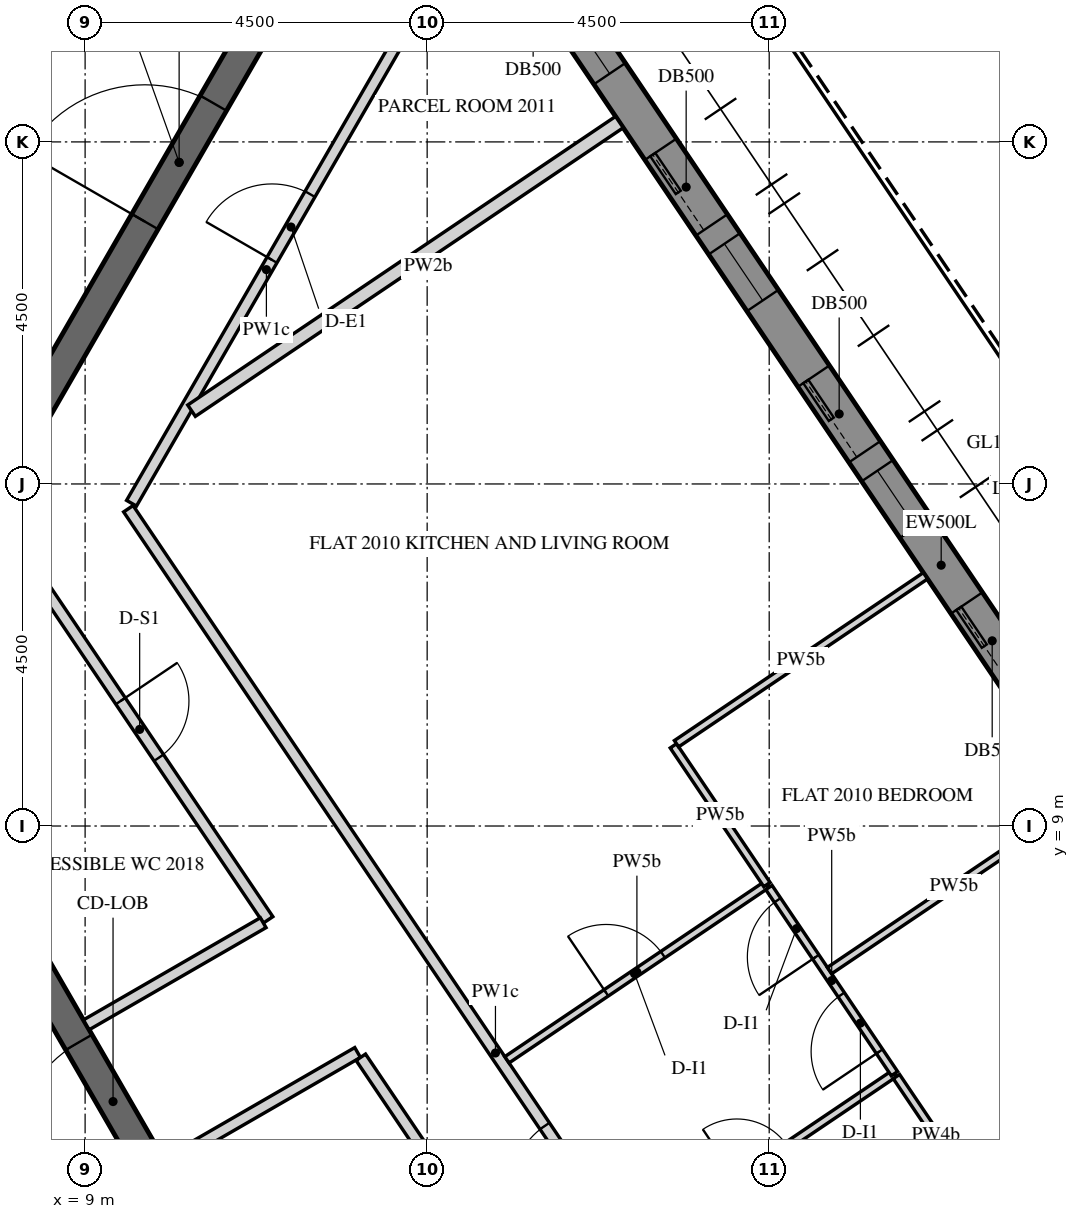
"""IFC4 building model, lengths in metres.
Left out: names, types, materials, properties, quantities, classifications, styles, units other than length and angle.
Written with IfcOpenShell. Run it as: python <this file> out.ifc"""

import sys

from ifc_helpers import new_model, si_unit, direction, frame, frame_2d, origin, place, context, subcontext, project, spatial, polyline, rectangle, outline, extrude, element, fill, save


model = new_model("IFC4")
c1 = context("Model", 3, precision=1e-05, world=origin(), true_north=direction((0.0, 1.0)))
c2 = subcontext(c1, "Body", "Model", "MODEL_VIEW")
j1 = project(units=[si_unit("LENGTHUNIT", "METRE"), si_unit("PLANEANGLEUNIT", "RADIAN")], contexts=[c1])
p1 = place(None, origin())
s1 = spatial("IfcSite", under=j1, at=p1, CompositionType="ELEMENT")
p2 = place(p1, origin())
s2 = spatial("IfcBuilding", under=s1, at=p2, CompositionType="ELEMENT")
p3 = place(p2, frame((0.0, 0.0, 260.1)))
s3 = spatial("IfcBuildingStorey", under=s2, at=p3, CompositionType="ELEMENT", Elevation=260.1)
p4 = place(p3, frame((26.706, 2.879, -0.15), z_axis=(0.0, 0.0, 1.0), x_axis=(-0.559197891507, 0.829034208061, 0.0)))
e1 = element("IfcWall", 1, at=p4, inside=s3, PredefinedType="SOLIDWALL", context=c2, shape_type="SweptSolid", body=[
    extrude(outline(polyline([(0.25, -0.25), (22.795, -0.25), (23.295, 0.25), (-0.25, 0.25), (0.25, -0.25)])), origin(), (0.0, 0.0, 1.0), 3.9),
])
p5 = place(p4, frame((1.323, 0.0, 1.05)))
e2 = element("IfcOpeningElement", 2, at=p5, cuts=e1, PredefinedType="OPENING", context=c2, shape_type="SweptSolid", body=[
    extrude(rectangle(XDim=0.9, YDim=1.5, at=frame_2d((0.45, 0.75))), frame((0.0, 0.26, 0.0), z_axis=(0.0, -1.0, 0.0), x_axis=(1.0, 0.0, 0.0)), (0.0, 0.0, 1.0), 0.52),
])
p6 = place(p4, frame((2.522, 0.0, 0.15)))
e3 = element("IfcOpeningElement", 3, at=p6, cuts=e1, PredefinedType="OPENING", context=c2, shape_type="SweptSolid", body=[
    extrude(rectangle(XDim=1.2, YDim=2.4, at=frame_2d((0.6, 1.2))), frame((0.0, 0.26, 0.0), z_axis=(0.0, -1.0, 0.0), x_axis=(1.0, 0.0, 0.0)), (0.0, 0.0, 1.0), 0.52),
])
p7 = place(p4, frame((4.922, 0.0, 1.05)))
e4 = element("IfcOpeningElement", 4, at=p7, cuts=e1, PredefinedType="OPENING", context=c2, shape_type="SweptSolid", body=[
    extrude(rectangle(XDim=0.9, YDim=1.5, at=frame_2d((0.45, 0.75))), frame((0.0, 0.26, 0.0), z_axis=(0.0, -1.0, 0.0), x_axis=(1.0, 0.0, 0.0)), (0.0, 0.0, 1.0), 0.52),
])
p8 = place(p4, frame((6.122, 0.0, 0.15)))
e5 = element("IfcOpeningElement", 5, at=p8, cuts=e1, PredefinedType="OPENING", context=c2, shape_type="SweptSolid", body=[
    extrude(rectangle(XDim=1.2, YDim=2.4, at=frame_2d((0.6, 1.2))), frame((0.0, 0.26, 0.0), z_axis=(0.0, -1.0, 0.0), x_axis=(1.0, 0.0, 0.0)), (0.0, 0.0, 1.0), 0.52),
])
p9 = place(p4, frame((8.522, 0.0, 1.05)))
e6 = element("IfcOpeningElement", 6, at=p9, cuts=e1, PredefinedType="OPENING", context=c2, shape_type="SweptSolid", body=[
    extrude(rectangle(XDim=0.9, YDim=1.5, at=frame_2d((0.45, 0.75))), frame((0.0, 0.26, 0.0), z_axis=(0.0, -1.0, 0.0), x_axis=(1.0, 0.0, 0.0)), (0.0, 0.0, 1.0), 0.52),
])
p10 = place(p4, frame((9.722, 0.0, 0.15)))
e7 = element("IfcOpeningElement", 7, at=p10, cuts=e1, PredefinedType="OPENING", context=c2, shape_type="SweptSolid", body=[
    extrude(rectangle(XDim=1.2, YDim=2.4, at=frame_2d((0.6, 1.2))), frame((0.0, 0.26, 0.0), z_axis=(0.0, -1.0, 0.0), x_axis=(1.0, 0.0, 0.0)), (0.0, 0.0, 1.0), 0.52),
])
p11 = place(p4, frame((12.122, 0.0, 1.05)))
e8 = element("IfcOpeningElement", 8, at=p11, cuts=e1, PredefinedType="OPENING", context=c2, shape_type="SweptSolid", body=[
    extrude(rectangle(XDim=0.9, YDim=1.5, at=frame_2d((0.45, 0.75))), frame((0.0, 0.26, 0.0), z_axis=(0.0, -1.0, 0.0), x_axis=(1.0, 0.0, 0.0)), (0.0, 0.0, 1.0), 0.52),
])
p12 = place(p4, frame((13.323, 0.0, 0.15)))
e9 = element("IfcOpeningElement", 9, at=p12, cuts=e1, PredefinedType="OPENING", context=c2, shape_type="SweptSolid", body=[
    extrude(rectangle(XDim=1.2, YDim=2.4, at=frame_2d((0.6, 1.2))), frame((0.0, 0.26, 0.0), z_axis=(0.0, -1.0, 0.0), x_axis=(1.0, 0.0, 0.0)), (0.0, 0.0, 1.0), 0.52),
])
p13 = place(p4, frame((15.722, 0.0, 1.05)))
e10 = element("IfcOpeningElement", 10, at=p13, cuts=e1, PredefinedType="OPENING", context=c2, shape_type="SweptSolid", body=[
    extrude(rectangle(XDim=0.9, YDim=1.5, at=frame_2d((0.45, 0.75))), frame((0.0, 0.26, 0.0), z_axis=(0.0, -1.0, 0.0), x_axis=(1.0, 0.0, 0.0)), (0.0, 0.0, 1.0), 0.52),
])
p14 = place(p4, frame((16.922, 0.0, 0.15)))
e11 = element("IfcOpeningElement", 11, at=p14, cuts=e1, PredefinedType="OPENING", context=c2, shape_type="SweptSolid", body=[
    extrude(rectangle(XDim=1.2, YDim=2.4, at=frame_2d((0.6, 1.2))), frame((0.0, 0.26, 0.0), z_axis=(0.0, -1.0, 0.0), x_axis=(1.0, 0.0, 0.0)), (0.0, 0.0, 1.0), 0.52),
])
p15 = place(p4, frame((19.323, 0.0, 1.05)))
e12 = element("IfcOpeningElement", 12, at=p15, cuts=e1, PredefinedType="OPENING", context=c2, shape_type="SweptSolid", body=[
    extrude(rectangle(XDim=0.9, YDim=1.5, at=frame_2d((0.45, 0.75))), frame((0.0, 0.26, 0.0), z_axis=(0.0, -1.0, 0.0), x_axis=(1.0, 0.0, 0.0)), (0.0, 0.0, 1.0), 0.52),
])
p16 = place(p4, frame((20.522, 0.0, 0.15)))
e13 = element("IfcOpeningElement", 13, at=p16, cuts=e1, PredefinedType="OPENING", context=c2, shape_type="SweptSolid", body=[
    extrude(rectangle(XDim=1.2, YDim=2.4, at=frame_2d((0.6, 1.2))), frame((0.0, 0.26, 0.0), z_axis=(0.0, -1.0, 0.0), x_axis=(1.0, 0.0, 0.0)), (0.0, 0.0, 1.0), 0.52),
])
p17 = place(p3, frame((12.471, 0.0, -0.15), z_axis=(0.0, 0.0, 1.0), x_axis=(-0.499996419489, 0.866027470984, 0.0)))
e14 = element("IfcWall", 14, at=p17, inside=s3, PredefinedType="SHEAR", context=c2, shape_type="SweptSolid", body=[
    extrude(outline(polyline([(-0.115, -0.2), (12.586, -0.2), (12.355, 0.2), (0.115, 0.2), (-0.115, -0.2)])), origin(), (0.0, 0.0, 1.0), 3.9),
])
p18 = place(p17, frame((5.306, 0.0, 0.15)))
e15 = element("IfcOpeningElement", 15, at=p18, cuts=e14, PredefinedType="OPENING", context=c2, shape_type="SweptSolid", body=[
    extrude(rectangle(XDim=1.8, YDim=2.4, at=frame_2d((0.9, 1.2))), frame((0.0, 0.21, 0.0), z_axis=(0.0, -1.0, 0.0), x_axis=(1.0, 0.0, 0.0)), (0.0, 0.0, 1.0), 0.42),
])
p19 = place(p3, frame((6.351, 11.0, -0.15), z_axis=(0.0, 0.0, 1.0), x_axis=(0.499998894578, 0.866026041999, 0.0)))
e16 = element("IfcWall", 16, at=p19, inside=s3, PredefinedType="SHEAR", context=c2, shape_type="SweptSolid", body=[
    extrude(rectangle(XDim=15.544, YDim=0.4, at=frame_2d((7.772, 0.0))), origin(), (0.0, 0.0, 1.0), 3.9),
])
p20 = place(p19, frame((6.872, 0.0, 0.15)))
e17 = element("IfcOpeningElement", 17, at=p20, cuts=e16, PredefinedType="OPENING", context=c2, shape_type="SweptSolid", body=[
    extrude(rectangle(XDim=1.8, YDim=2.4, at=frame_2d((0.9, 1.2))), frame((0.0, 0.21, 0.0), z_axis=(0.0, -1.0, 0.0), x_axis=(1.0, 0.0, 0.0)), (0.0, 0.0, 1.0), 0.42),
])
p21 = place(p3, frame((19.228, -1.146, 0.0), z_axis=(0.0, 0.0, 1.0), x_axis=(-0.559190017735, 0.829039519001, 0.0)))
e18 = element("IfcWall", 18, at=p21, inside=s3, PredefinedType="PARTITIONING", context=c2, shape_type="SweptSolid", body=[
    extrude(rectangle(XDim=17.273, YDim=0.15, at=frame_2d((8.637, 0.0))), origin(), (0.0, 0.0, 1.0), 2.823),
])
p22 = place(p21, frame((6.478, 0.0, 0.0)))
e19 = element("IfcOpeningElement", 19, at=p22, cuts=e18, PredefinedType="OPENING", context=c2, shape_type="SweptSolid", body=[
    extrude(rectangle(XDim=1.0, YDim=2.1, at=frame_2d((0.5, 1.05))), frame((0.0, 0.085, 0.0), z_axis=(0.0, -1.0, 0.0), x_axis=(1.0, 0.0, 0.0)), (0.0, 0.0, 1.0), 0.17),
])
p23 = place(p3, frame((9.611, 13.246, 0.0), z_axis=(0.0, 0.0, 1.0), x_axis=(0.499994435258, 0.866028616566, 0.0)))
e20 = element("IfcWall", 20, at=p23, inside=s3, PredefinedType="PARTITIONING", context=c2, shape_type="SweptSolid", body=[
    extrude(rectangle(XDim=7.097, YDim=0.15, at=frame_2d((3.548, 0.0))), origin(), (0.0, 0.0, 1.0), 2.823),
])
p24 = place(p23, frame((3.696, 0.0, 0.0)))
e21 = element("IfcOpeningElement", 21, at=p24, cuts=e20, PredefinedType="OPENING", context=c2, shape_type="SweptSolid", body=[
    extrude(rectangle(XDim=1.0, YDim=2.1, at=frame_2d((0.5, 1.05))), frame((0.0, 0.085, 0.0), z_axis=(0.0, -1.0, 0.0), x_axis=(1.0, 0.0, 0.0)), (0.0, 0.0, 1.0), 0.17),
])
p25 = place(p3, frame((10.066, 4.566, 0.0), z_axis=(0.0, 0.0, 1.0), x_axis=(0.866034661658, 0.49998396455, 0.0)))
e22 = element("IfcWall", 22, at=p25, inside=s3, PredefinedType="PARTITIONING", context=c2, shape_type="SweptSolid", body=[
    extrude(rectangle(XDim=2.909, YDim=0.15, at=frame_2d((1.455, 0.0))), origin(), (0.0, 0.0, 1.0), 2.823),
])
p26 = place(p3, frame((12.627, 5.958, 0.0), z_axis=(0.0, 0.0, 1.0), x_axis=(0.559185493191, -0.829042570804, 0.0)))
e23 = element("IfcWall", 23, at=p26, inside=s3, PredefinedType="PARTITIONING", context=c2, shape_type="SweptSolid", body=[
    extrude(rectangle(XDim=8.727, YDim=0.15, at=frame_2d((4.363, 0.0))), origin(), (0.0, 0.0, 1.0), 2.823),
])
p27 = place(p26, frame((3.913, 0.0, 0.0)))
e24 = element("IfcOpeningElement", 24, at=p27, cuts=e23, PredefinedType="OPENING", context=c2, shape_type="SweptSolid", body=[
    extrude(rectangle(XDim=0.9, YDim=2.1, at=frame_2d((0.45, 1.05))), frame((0.0, 0.085, 0.0), z_axis=(0.0, -1.0, 0.0), x_axis=(1.0, 0.0, 0.0)), (0.0, 0.0, 1.0), 0.17),
])
p28 = place(p3, frame((8.028, 12.777, 0.0), z_axis=(0.0, 0.0, 1.0), x_axis=(0.559175239609, -0.829049486707, 0.0)))
e25 = element("IfcWall", 25, at=p28, inside=s3, PredefinedType="PARTITIONING", context=c2, shape_type="SweptSolid", body=[
    extrude(rectangle(XDim=6.045, YDim=0.15, at=frame_2d((3.022, 0.0))), origin(), (0.0, 0.0, 1.0), 2.823),
])
p29 = place(p28, frame((2.572, 0.0, 0.0)))
e26 = element("IfcOpeningElement", 26, at=p29, cuts=e25, PredefinedType="OPENING", context=c2, shape_type="SweptSolid", body=[
    extrude(rectangle(XDim=0.9, YDim=2.1, at=frame_2d((0.45, 1.05))), frame((0.0, 0.085, 0.0), z_axis=(0.0, -1.0, 0.0), x_axis=(1.0, 0.0, 0.0)), (0.0, 0.0, 1.0), 0.17),
])
p30 = place(p3, frame((11.343, 7.728, 0.0), z_axis=(0.0, 0.0, 1.0), x_axis=(-0.866037314867, -0.499979368833, 0.0)))
e27 = element("IfcWall", 27, at=p30, inside=s3, PredefinedType="PARTITIONING", context=c2, shape_type="SweptSolid", body=[
    extrude(rectangle(XDim=2.687, YDim=0.15, at=frame_2d((1.344, 0.0))), origin(), (0.0, 0.0, 1.0), 2.823),
])
p31 = place(p3, frame((24.082, 6.323, 0.0), z_axis=(0.0, 0.0, 1.0), x_axis=(-0.829033253898, -0.55919930609, 0.0)))
e28 = element("IfcWall", 28, at=p31, inside=s3, PredefinedType="PARTITIONING", context=c2, shape_type="SweptSolid", body=[
    extrude(rectangle(XDim=8.125, YDim=0.18, at=frame_2d((4.062, 0.0))), origin(), (0.0, 0.0, 1.0), 2.823),
])
p32 = place(p3, frame((14.55, 5.924, 0.0), z_axis=(0.0, 0.0, 1.0), x_axis=(0.829005765264, 0.559240056827, 0.0)))
e29 = element("IfcWall", 29, at=p32, inside=s3, PredefinedType="PARTITIONING", context=c2, shape_type="SweptSolid", body=[
    extrude(rectangle(XDim=4.125, YDim=0.1, at=frame_2d((2.062, 0.0))), origin(), (0.0, 0.0, 1.0), 2.823),
])
p33 = place(p32, frame((1.575, 0.0, 0.0)))
e30 = element("IfcOpeningElement", 30, at=p33, cuts=e29, PredefinedType="OPENING", context=c2, shape_type="SweptSolid", body=[
    extrude(rectangle(XDim=0.9, YDim=2.1, at=frame_2d((0.45, 1.05))), frame((0.0, 0.06, 0.0), z_axis=(0.0, -1.0, 0.0), x_axis=(1.0, 0.0, 0.0)), (0.0, 0.0, 1.0), 0.12),
])
p34 = place(p3, frame((17.971, 8.229, 0.0), z_axis=(0.0, 0.0, 1.0), x_axis=(-0.559246231198, 0.829001600053, 0.0)))
e31 = element("IfcWall", 31, at=p34, inside=s3, PredefinedType="PARTITIONING", context=c2, shape_type="SweptSolid", body=[
    extrude(rectangle(XDim=2.202, YDim=0.1, at=frame_2d((1.101, 0.0))), origin(), (0.0, 0.0, 1.0), 2.823),
])
p35 = place(p3, frame((16.781, 10.083, 0.0), z_axis=(0.0, 0.0, 1.0), x_axis=(0.829042808667, 0.559185140536, 0.0)))
e32 = element("IfcWall", 32, at=p35, inside=s3, PredefinedType="PARTITIONING", context=c2, shape_type="SweptSolid", body=[
    extrude(rectangle(XDim=3.95, YDim=0.1, at=frame_2d((1.975, 0.0))), origin(), (0.0, 0.0, 1.0), 2.823),
])
p36 = place(p3, frame((16.029, 18.26, 0.0), z_axis=(0.0, 0.0, 1.0), x_axis=(-0.82904538001, -0.559181328268, 0.0)))
e33 = element("IfcWall", 33, at=p36, inside=s3, PredefinedType="PARTITIONING", context=c2, shape_type="SweptSolid", body=[
    extrude(rectangle(XDim=6.79, YDim=0.18, at=frame_2d((3.395, 0.0))), origin(), (0.0, 0.0, 1.0), 2.823),
])
p37 = place(p3, frame((16.227, 3.437, 0.0), z_axis=(0.0, 0.0, 1.0), x_axis=(0.829033204172, 0.559199379811, 0.0)))
e34 = element("IfcWall", 34, at=p37, inside=s3, PredefinedType="PARTITIONING", context=c2, shape_type="SweptSolid", body=[
    extrude(rectangle(XDim=4.125, YDim=0.1, at=frame_2d((2.062, 0.0))), origin(), (0.0, 0.0, 1.0), 2.823),
])
p38 = place(p37, frame((1.625, 0.0, 0.0)))
e35 = element("IfcOpeningElement", 35, at=p38, cuts=e34, PredefinedType="OPENING", context=c2, shape_type="SweptSolid", body=[
    extrude(rectangle(XDim=0.8, YDim=2.1, at=frame_2d((0.4, 1.05))), frame((0.0, 0.06, 0.0), z_axis=(0.0, -1.0, 0.0), x_axis=(1.0, 0.0, 0.0)), (0.0, 0.0, 1.0), 0.12),
])
p39 = place(p3, frame((19.648, 5.742, 0.0), z_axis=(0.0, 0.0, 1.0), x_axis=(-0.559193191328, 0.829037378393, 0.0)))
e36 = element("IfcWall", 36, at=p39, inside=s3, PredefinedType="PARTITIONING", context=c2, shape_type="SweptSolid", body=[
    extrude(rectangle(XDim=2.954, YDim=0.1, at=frame_2d((1.477, 0.0))), origin(), (0.0, 0.0, 1.0), 2.823),
])
p40 = place(p39, frame((0.352, 0.0, 0.0)))
e37 = element("IfcOpeningElement", 37, at=p40, cuts=e36, PredefinedType="OPENING", context=c2, shape_type="SweptSolid", body=[
    extrude(rectangle(XDim=0.9, YDim=2.1, at=frame_2d((0.45, 1.05))), frame((0.0, 0.06, 0.0), z_axis=(0.0, -1.0, 0.0), x_axis=(1.0, 0.0, 0.0)), (0.0, 0.0, 1.0), 0.12),
])
p41 = place(p39, frame((1.852, 0.0, 0.0)))
e38 = element("IfcOpeningElement", 38, at=p41, cuts=e36, PredefinedType="OPENING", context=c2, shape_type="SweptSolid", body=[
    extrude(rectangle(XDim=0.9, YDim=2.1, at=frame_2d((0.45, 1.05))), frame((0.0, 0.06, 0.0), z_axis=(0.0, -1.0, 0.0), x_axis=(1.0, 0.0, 0.0)), (0.0, 0.0, 1.0), 0.12),
])
p42 = place(p3, frame((20.715, 4.16, 0.0), z_axis=(0.0, 0.0, 1.0), x_axis=(-0.559200351269, 0.829032548903, 0.0)))
e39 = element("IfcWall", 39, at=p42, inside=s3, PredefinedType="PARTITIONING", context=c2, shape_type="SweptSolid", body=[
    extrude(rectangle(XDim=1.862, YDim=0.1, at=frame_2d((0.931, 0.0))), origin(), (0.0, 0.0, 1.0), 2.823),
])
p43 = place(p3, frame((22.069, 9.307, 0.0), z_axis=(0.0, 0.0, 1.0), x_axis=(-0.829062134085, -0.559156487779, 0.0)))
e40 = element("IfcWall", 40, at=p43, inside=s3, PredefinedType="PARTITIONING", context=c2, shape_type="SweptSolid", body=[
    extrude(rectangle(XDim=3.95, YDim=0.1, at=frame_2d((1.975, 0.0))), origin(), (0.0, 0.0, 1.0), 2.823),
])
p44 = place(p10, frame((0.0, 0.175, 0.0)))
e41 = element("IfcDoor", 41, at=p44, inside=s3, OperationType="SLIDING_TO_LEFT", PredefinedType="DOOR", context=c2, shape_type="SweptSolid", body=[
    extrude(rectangle(XDim=1.2, YDim=2.4, at=frame_2d((0.6, 1.2))), frame((0.0, 0.025, 0.0), z_axis=(0.0, -1.0, 0.0), x_axis=(1.0, 0.0, 0.0)), (0.0, 0.0, 1.0), 0.05),
])
fill(e7, e41)
p45 = place(p11, frame((0.0, 0.18, 0.0)))
e42 = element("IfcWindow", 42, at=p45, inside=s3, PartitioningType="SINGLE_PANEL", PredefinedType="WINDOW", context=c2, shape_type="SweptSolid", body=[
    extrude(rectangle(XDim=0.9, YDim=1.5, at=frame_2d((0.45, 0.75))), frame((0.0, 0.03, 0.0), z_axis=(0.0, -1.0, 0.0), x_axis=(1.0, 0.0, 0.0)), (0.0, 0.0, 1.0), 0.06),
])
fill(e8, e42)
p46 = place(p12, frame((0.0, 0.175, 0.0)))
e43 = element("IfcDoor", 43, at=p46, inside=s3, OperationType="SLIDING_TO_LEFT", PredefinedType="DOOR", context=c2, shape_type="SweptSolid", body=[
    extrude(rectangle(XDim=1.2, YDim=2.4, at=frame_2d((0.6, 1.2))), frame((0.0, 0.025, 0.0), z_axis=(0.0, -1.0, 0.0), x_axis=(1.0, 0.0, 0.0)), (0.0, 0.0, 1.0), 0.05),
])
fill(e9, e43)
p47 = place(p13, frame((0.0, 0.18, 0.0)))
e44 = element("IfcWindow", 44, at=p47, inside=s3, PartitioningType="SINGLE_PANEL", PredefinedType="WINDOW", context=c2, shape_type="SweptSolid", body=[
    extrude(rectangle(XDim=0.9, YDim=1.5, at=frame_2d((0.45, 0.75))), frame((0.0, 0.03, 0.0), z_axis=(0.0, -1.0, 0.0), x_axis=(1.0, 0.0, 0.0)), (0.0, 0.0, 1.0), 0.06),
])
fill(e10, e44)
p48 = place(p14, frame((0.0, 0.175, 0.0)))
e45 = element("IfcDoor", 45, at=p48, inside=s3, OperationType="SLIDING_TO_LEFT", PredefinedType="DOOR", context=c2, shape_type="SweptSolid", body=[
    extrude(rectangle(XDim=1.2, YDim=2.4, at=frame_2d((0.6, 1.2))), frame((0.0, 0.025, 0.0), z_axis=(0.0, -1.0, 0.0), x_axis=(1.0, 0.0, 0.0)), (0.0, 0.0, 1.0), 0.05),
])
fill(e11, e45)
p49 = place(p15, frame((0.0, 0.18, 0.0)))
e46 = element("IfcWindow", 46, at=p49, inside=s3, PartitioningType="SINGLE_PANEL", PredefinedType="WINDOW", context=c2, shape_type="SweptSolid", body=[
    extrude(rectangle(XDim=0.9, YDim=1.5, at=frame_2d((0.45, 0.75))), frame((0.0, 0.03, 0.0), z_axis=(0.0, -1.0, 0.0), x_axis=(1.0, 0.0, 0.0)), (0.0, 0.0, 1.0), 0.06),
])
fill(e12, e46)
p50 = place(p18, origin())
e47 = element("IfcDoor", 47, at=p50, inside=s3, OperationType="DOUBLE_DOOR_SINGLE_SWING", PredefinedType="DOOR", context=c2, shape_type="SweptSolid", body=[
    extrude(rectangle(XDim=1.8, YDim=2.4, at=frame_2d((0.9, 1.2))), frame((0.0, 0.025, 0.0), z_axis=(0.0, -1.0, 0.0), x_axis=(1.0, 0.0, 0.0)), (0.0, 0.0, 1.0), 0.05),
])
fill(e15, e47)
p51 = place(p20, origin())
e48 = element("IfcDoor", 48, at=p51, inside=s3, OperationType="DOUBLE_DOOR_SINGLE_SWING", PredefinedType="DOOR", context=c2, shape_type="SweptSolid", body=[
    extrude(rectangle(XDim=1.8, YDim=2.4, at=frame_2d((0.9, 1.2))), frame((0.0, 0.025, 0.0), z_axis=(0.0, -1.0, 0.0), x_axis=(1.0, 0.0, 0.0)), (0.0, 0.0, 1.0), 0.05),
])
fill(e17, e48)
p52 = place(p22, origin())
e49 = element("IfcDoor", 49, at=p52, inside=s3, OperationType="SINGLE_SWING_RIGHT", PredefinedType="DOOR", context=c2, shape_type="SweptSolid", body=[
    extrude(rectangle(XDim=1.0, YDim=2.1, at=frame_2d((0.5, 1.05))), frame((0.0, 0.025, 0.0), z_axis=(0.0, -1.0, 0.0), x_axis=(1.0, 0.0, 0.0)), (0.0, 0.0, 1.0), 0.05),
])
fill(e19, e49)
p53 = place(p33, origin())
e50 = element("IfcDoor", 50, at=p53, inside=s3, OperationType="SINGLE_SWING_RIGHT", PredefinedType="DOOR", context=c2, shape_type="SweptSolid", body=[
    extrude(rectangle(XDim=0.9, YDim=2.1, at=frame_2d((0.45, 1.05))), frame((0.0, 0.025, 0.0), z_axis=(0.0, -1.0, 0.0), x_axis=(1.0, 0.0, 0.0)), (0.0, 0.0, 1.0), 0.05),
])
fill(e30, e50)
p54 = place(p40, origin())
e51 = element("IfcDoor", 51, at=p54, inside=s3, OperationType="SINGLE_SWING_RIGHT", PredefinedType="DOOR", context=c2, shape_type="SweptSolid", body=[
    extrude(rectangle(XDim=0.9, YDim=2.1, at=frame_2d((0.45, 1.05))), frame((0.0, 0.025, 0.0), z_axis=(0.0, -1.0, 0.0), x_axis=(1.0, 0.0, 0.0)), (0.0, 0.0, 1.0), 0.05),
])
fill(e37, e51)
p55 = place(p41, origin())
e52 = element("IfcDoor", 52, at=p55, inside=s3, OperationType="SINGLE_SWING_LEFT", PredefinedType="DOOR", context=c2, shape_type="SweptSolid", body=[
    extrude(rectangle(XDim=0.9, YDim=2.1, at=frame_2d((0.45, 1.05))), frame((0.0, 0.025, 0.0), z_axis=(0.0, -1.0, 0.0), x_axis=(1.0, 0.0, 0.0)), (0.0, 0.0, 1.0), 0.05),
])
fill(e38, e52)
p56 = place(p24, origin())
e53 = element("IfcDoor", 53, at=p56, inside=s3, OperationType="SINGLE_SWING_RIGHT", PredefinedType="DOOR", context=c2, shape_type="SweptSolid", body=[
    extrude(rectangle(XDim=1.0, YDim=2.1, at=frame_2d((0.5, 1.05))), frame((0.0, 0.025, 0.0), z_axis=(0.0, -1.0, 0.0), x_axis=(1.0, 0.0, 0.0)), (0.0, 0.0, 1.0), 0.05),
])
fill(e21, e53)
p57 = place(p29, origin())
e54 = element("IfcDoor", 54, at=p57, inside=s3, OperationType="SINGLE_SWING_RIGHT", PredefinedType="DOOR", context=c2, shape_type="SweptSolid", body=[
    extrude(rectangle(XDim=0.9, YDim=2.1, at=frame_2d((0.45, 1.05))), frame((0.0, 0.025, 0.0), z_axis=(0.0, -1.0, 0.0), x_axis=(1.0, 0.0, 0.0)), (0.0, 0.0, 1.0), 0.05),
])
fill(e26, e54)
save(model, sys.argv[1])
